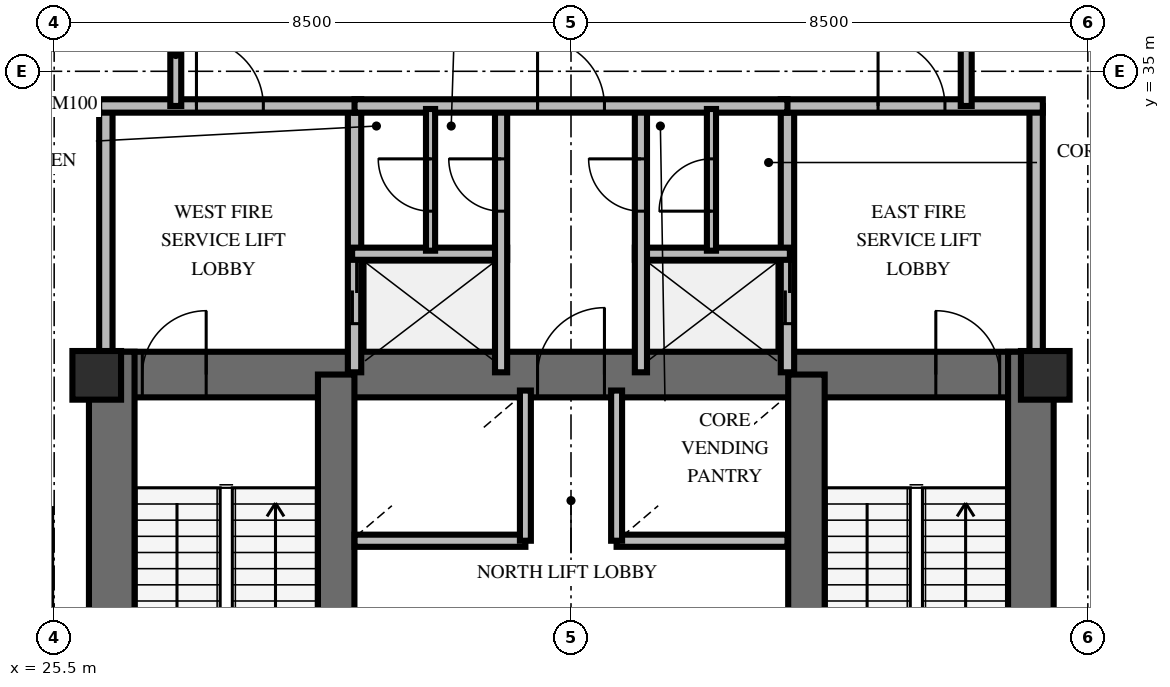
"""IFC4 building model, lengths in metres.
Left out: names, types, materials, properties, quantities, classifications, styles, units other than length and angle.
Written with IfcOpenShell. Run it as: python <this file> out.ifc"""

import sys

from ifc_helpers import new_model, si_unit, direction, frame, frame_2d, origin, origin_2d, place, context, subcontext, project, spatial, rectangle, extrude, element, fill, save


model = new_model("IFC4")
c1 = context("Model", 3, precision=1e-05, world=origin(), true_north=direction((0.0, 1.0)))
c2 = subcontext(c1, "Body", "Model", "MODEL_VIEW")
j1 = project(units=[si_unit("LENGTHUNIT", "METRE"), si_unit("PLANEANGLEUNIT", "RADIAN")], contexts=[c1])
p1 = place(None, origin())
s1 = spatial("IfcSite", under=j1, at=p1, CompositionType="ELEMENT")
p2 = place(p1, origin())
s2 = spatial("IfcBuilding", under=s1, at=p2, CompositionType="ELEMENT")
p3 = place(p2, frame((0.0, 0.0, 105.8)))
s3 = spatial("IfcBuildingStorey", under=s2, at=p3, CompositionType="ELEMENT", Elevation=105.8)
p4 = place(p3, frame((26.072, 30.013, 0.0), z_axis=(0.0, 0.0, 1.0), x_axis=(1.0, 0.0, 0.0)))
e1 = element("IfcWall", 1, at=p4, inside=s3, PredefinedType="SHEAR", context=c2, shape_type="SweptSolid", body=[
    extrude(rectangle(XDim=15.866, YDim=0.75, at=frame_2d((7.933, 0.0))), origin(), (0.0, 0.0, 1.0), 4.0),
])
p5 = place(p4, frame((0.878, 0.0, 0.0)))
e2 = element("IfcOpeningElement", 2, at=p5, cuts=e1, PredefinedType="OPENING", context=c2, shape_type="SweptSolid", body=[
    extrude(rectangle(XDim=1.05, YDim=2.15, at=frame_2d((0.525, 1.075))), frame((0.0, 0.385, 0.0), z_axis=(0.0, -1.0, 0.0), x_axis=(1.0, 0.0, 0.0)), (0.0, 0.0, 1.0), 0.77),
])
p6 = place(p4, frame((13.928, 0.0, 0.0)))
e3 = element("IfcOpeningElement", 3, at=p6, cuts=e1, PredefinedType="OPENING", context=c2, shape_type="SweptSolid", body=[
    extrude(rectangle(XDim=1.05, YDim=2.15, at=frame_2d((0.525, 1.075))), frame((0.0, 0.385, 0.0), z_axis=(0.0, -1.0, 0.0), x_axis=(1.0, 0.0, 0.0)), (0.0, 0.0, 1.0), 0.77),
])
p7 = place(p4, frame((7.378, 0.0, 0.0)))
e4 = element("IfcOpeningElement", 4, at=p7, cuts=e1, PredefinedType="OPENING", context=c2, shape_type="SweptSolid", body=[
    extrude(rectangle(XDim=1.1, YDim=2.15, at=frame_2d((0.55, 1.075))), frame((0.0, 0.385, 0.0), z_axis=(0.0, -1.0, 0.0), x_axis=(1.0, 0.0, 0.0)), (0.0, 0.0, 1.0), 0.77),
])
for number, where, z_axis, x_axis in (
    (5, (26.447, 19.812, 0.0), (0.0, 0.0, 1.0), (0.0, 1.0, 0.0)),
    (6, (41.563, 19.812, 0.0), (0.0, 0.0, 1.0), (0.0, 1.0, 0.0)),
):
    element("IfcWall", number, at=place(p3, frame(where, z_axis=z_axis, x_axis=x_axis)), inside=s3, PredefinedType="SHEAR", context=c2, shape_type="SweptSolid", body=[
        extrude(rectangle(XDim=10.576, YDim=0.75, at=frame_2d((5.288, 0.0))), origin(), (0.0, 0.0, 1.0), 4.0),
    ])
for number, where, z_axis, x_axis in (
    (7, (30.138, 20.187, 0.0), (0.0, 0.0, 1.0), (0.0, 1.0, 0.0)),
    (8, (37.872, 20.187, 0.0), (0.0, 0.0, 1.0), (0.0, 1.0, 0.0)),
):
    element("IfcWall", number, at=place(p3, frame(where, z_axis=z_axis, x_axis=x_axis)), inside=s3, PredefinedType="SHEAR", context=c2, shape_type="SweptSolid", body=[
        extrude(rectangle(XDim=9.826, YDim=0.6, at=frame_2d((4.913, 0.0))), origin(), (0.0, 0.0, 1.0), 4.0),
    ])
for number, where, z_axis, x_axis in (
    (9, (26.2, 30.0, 0.0), (0.0, 0.0, 1.0), (1.0, 0.0, 0.0)),
    (10, (41.8, 30.0, 0.0), (0.0, 0.0, 1.0), (1.0, 0.0, 0.0)),
):
    element("IfcColumn", number, at=place(p3, frame(where, z_axis=z_axis, x_axis=x_axis)), inside=s3, PredefinedType="PILASTER", context=c2, shape_type="SweptSolid", body=[
        extrude(rectangle(XDim=0.8, YDim=0.8, at=origin_2d()), origin(), (0.0, 0.0, 1.0), 4.0),
    ])
p8 = place(p3, frame((26.35, 30.05, 0.0), z_axis=(0.0, 0.0, 1.0), x_axis=(0.0, 1.0, 0.0)))
e11 = element("IfcWall", 11, at=p8, inside=s3, PredefinedType="SOLIDWALL", context=c2, shape_type="SweptSolid", body=[
    extrude(rectangle(XDim=4.38, YDim=0.22, at=frame_2d((2.19, 0.0))), origin(), (0.0, 0.0, 1.0), 2.8),
])
p9 = place(p3, frame((30.44, 30.05, 0.0), z_axis=(0.0, 0.0, 1.0), x_axis=(0.0, 1.0, 0.0)))
e12 = element("IfcWall", 12, at=p9, inside=s3, PredefinedType="SOLIDWALL", context=c2, shape_type="SweptSolid", body=[
    extrude(rectangle(XDim=4.38, YDim=0.22, at=frame_2d((2.19, 0.0))), origin(), (0.0, 0.0, 1.0), 2.8),
])
p10 = place(p9, frame((0.8, 0.0, 0.0)))
e13 = element("IfcOpeningElement", 13, at=p10, cuts=e12, PredefinedType="OPENING", context=c2, shape_type="SweptSolid", body=[
    extrude(rectangle(XDim=1.05, YDim=2.1, at=frame_2d((0.525, 1.05))), frame((0.0, 0.12, 0.0), z_axis=(0.0, -1.0, 0.0), x_axis=(1.0, 0.0, 0.0)), (0.0, 0.0, 1.0), 0.24),
])
p11 = place(p3, frame((26.24, 34.43, 0.0), z_axis=(0.0, 0.0, 1.0), x_axis=(1.0, 0.0, 0.0)))
e14 = element("IfcWall", 14, at=p11, inside=s3, PredefinedType="SOLIDWALL", context=c2, shape_type="SweptSolid", body=[
    extrude(rectangle(XDim=4.31, YDim=0.22, at=frame_2d((2.155, 0.0))), origin(), (0.0, 0.0, 1.0), 2.8),
])
p12 = place(p11, frame((1.6, 0.0, 0.0)))
e15 = element("IfcOpeningElement", 15, at=p12, cuts=e14, PredefinedType="OPENING", context=c2, shape_type="SweptSolid", body=[
    extrude(rectangle(XDim=1.1, YDim=2.15, at=frame_2d((0.55, 1.075))), frame((0.0, 0.12, 0.0), z_axis=(0.0, -1.0, 0.0), x_axis=(1.0, 0.0, 0.0)), (0.0, 0.0, 1.0), 0.24),
])
p13 = place(p3, frame((30.4, 32.0, 0.0), z_axis=(0.0, 0.0, 1.0), x_axis=(1.0, 0.0, 0.0)))
e16 = element("IfcWall", 16, at=p13, inside=s3, PredefinedType="SOLIDWALL", context=c2, shape_type="SweptSolid", body=[
    extrude(rectangle(XDim=2.55, YDim=0.2, at=frame_2d((1.275, 0.0))), origin(), (0.0, 0.0, 1.0), 2.8),
])
p14 = place(p3, frame((32.85, 30.05, 0.0), z_axis=(0.0, 0.0, 1.0), x_axis=(0.0, 1.0, 0.0)))
e17 = element("IfcWall", 17, at=p14, inside=s3, PredefinedType="SOLIDWALL", context=c2, shape_type="SweptSolid", body=[
    extrude(rectangle(XDim=4.38, YDim=0.2, at=frame_2d((2.19, 0.0))), origin(), (0.0, 0.0, 1.0), 2.8),
])
p15 = place(p14, frame((2.65, 0.0, 0.0)))
e18 = element("IfcOpeningElement", 18, at=p15, cuts=e17, PredefinedType="OPENING", context=c2, shape_type="SweptSolid", body=[
    extrude(rectangle(XDim=0.86, YDim=2.05, at=frame_2d((0.43, 1.025))), frame((0.0, 0.11, 0.0), z_axis=(0.0, -1.0, 0.0), x_axis=(1.0, 0.0, 0.0)), (0.0, 0.0, 1.0), 0.22),
])
p16 = place(p3, frame((37.56, 30.05, 0.0), z_axis=(0.0, 0.0, 1.0), x_axis=(0.0, 1.0, 0.0)))
e19 = element("IfcWall", 19, at=p16, inside=s3, PredefinedType="SOLIDWALL", context=c2, shape_type="SweptSolid", body=[
    extrude(rectangle(XDim=4.38, YDim=0.22, at=frame_2d((2.19, 0.0))), origin(), (0.0, 0.0, 1.0), 2.8),
])
p17 = place(p16, frame((0.8, 0.0, 0.0)))
e20 = element("IfcOpeningElement", 20, at=p17, cuts=e19, PredefinedType="OPENING", context=c2, shape_type="SweptSolid", body=[
    extrude(rectangle(XDim=1.05, YDim=2.1, at=frame_2d((0.525, 1.05))), frame((0.0, 0.12, 0.0), z_axis=(0.0, -1.0, 0.0), x_axis=(1.0, 0.0, 0.0)), (0.0, 0.0, 1.0), 0.24),
])
p18 = place(p3, frame((41.65, 30.05, 0.0), z_axis=(0.0, 0.0, 1.0), x_axis=(0.0, 1.0, 0.0)))
e21 = element("IfcWall", 21, at=p18, inside=s3, PredefinedType="SOLIDWALL", context=c2, shape_type="SweptSolid", body=[
    extrude(rectangle(XDim=4.38, YDim=0.22, at=frame_2d((2.19, 0.0))), origin(), (0.0, 0.0, 1.0), 2.8),
])
p19 = place(p3, frame((37.45, 34.43, 0.0), z_axis=(0.0, 0.0, 1.0), x_axis=(1.0, 0.0, 0.0)))
e22 = element("IfcWall", 22, at=p19, inside=s3, PredefinedType="SOLIDWALL", context=c2, shape_type="SweptSolid", body=[
    extrude(rectangle(XDim=4.31, YDim=0.22, at=frame_2d((2.155, 0.0))), origin(), (0.0, 0.0, 1.0), 2.8),
])
p20 = place(p19, frame((1.6, 0.0, 0.0)))
e23 = element("IfcOpeningElement", 23, at=p20, cuts=e22, PredefinedType="OPENING", context=c2, shape_type="SweptSolid", body=[
    extrude(rectangle(XDim=1.1, YDim=2.15, at=frame_2d((0.55, 1.075))), frame((0.0, 0.12, 0.0), z_axis=(0.0, -1.0, 0.0), x_axis=(1.0, 0.0, 0.0)), (0.0, 0.0, 1.0), 0.24),
])
p21 = place(p3, frame((35.05, 32.0, 0.0), z_axis=(0.0, 0.0, 1.0), x_axis=(1.0, 0.0, 0.0)))
e24 = element("IfcWall", 24, at=p21, inside=s3, PredefinedType="SOLIDWALL", context=c2, shape_type="SweptSolid", body=[
    extrude(rectangle(XDim=2.55, YDim=0.2, at=frame_2d((1.275, 0.0))), origin(), (0.0, 0.0, 1.0), 2.8),
])
p22 = place(p3, frame((35.15, 30.05, 0.0), z_axis=(0.0, 0.0, 1.0), x_axis=(0.0, 1.0, 0.0)))
e25 = element("IfcWall", 25, at=p22, inside=s3, PredefinedType="SOLIDWALL", context=c2, shape_type="SweptSolid", body=[
    extrude(rectangle(XDim=4.38, YDim=0.2, at=frame_2d((2.19, 0.0))), origin(), (0.0, 0.0, 1.0), 2.8),
])
p23 = place(p22, frame((2.65, 0.0, 0.0)))
e26 = element("IfcOpeningElement", 26, at=p23, cuts=e25, PredefinedType="OPENING", context=c2, shape_type="SweptSolid", body=[
    extrude(rectangle(XDim=0.86, YDim=2.05, at=frame_2d((0.43, 1.025))), frame((0.0, 0.11, 0.0), z_axis=(0.0, -1.0, 0.0), x_axis=(1.0, 0.0, 0.0)), (0.0, 0.0, 1.0), 0.22),
])
p24 = place(p3, frame((30.44, 34.43, 0.0), z_axis=(0.0, 0.0, 1.0), x_axis=(1.0, 0.0, 0.0)))
e27 = element("IfcWall", 27, at=p24, inside=s3, PredefinedType="SOLIDWALL", context=c2, shape_type="SweptSolid", body=[
    extrude(rectangle(XDim=7.12, YDim=0.22, at=frame_2d((3.56, 0.0))), origin(), (0.0, 0.0, 1.0), 2.8),
])
p25 = place(p24, frame((3.01, 0.0, 0.0)))
e28 = element("IfcOpeningElement", 28, at=p25, cuts=e27, PredefinedType="OPENING", context=c2, shape_type="SweptSolid", body=[
    extrude(rectangle(XDim=1.1, YDim=2.15, at=frame_2d((0.55, 1.075))), frame((0.0, 0.12, 0.0), z_axis=(0.0, -1.0, 0.0), x_axis=(1.0, 0.0, 0.0)), (0.0, 0.0, 1.0), 0.24),
])
p26 = place(p3, frame((31.69, 32.05, 0.0), z_axis=(0.0, 0.0, 1.0), x_axis=(0.0, 1.0, 0.0)))
e29 = element("IfcWall", 29, at=p26, inside=s3, PredefinedType="PARTITIONING", context=c2, shape_type="SweptSolid", body=[
    extrude(rectangle(XDim=2.33, YDim=0.15, at=frame_2d((1.165, 0.0))), origin(), (0.0, 0.0, 1.0), 2.8),
])
p27 = place(p26, frame((0.65, 0.0, 0.0)))
e30 = element("IfcOpeningElement", 30, at=p27, cuts=e29, PredefinedType="OPENING", context=c2, shape_type="SweptSolid", body=[
    extrude(rectangle(XDim=0.86, YDim=2.05, at=frame_2d((0.43, 1.025))), frame((0.0, 0.085, 0.0), z_axis=(0.0, -1.0, 0.0), x_axis=(1.0, 0.0, 0.0)), (0.0, 0.0, 1.0), 0.17),
])
p28 = place(p3, frame((36.31, 32.05, 0.0), z_axis=(0.0, 0.0, 1.0), x_axis=(0.0, 1.0, 0.0)))
e31 = element("IfcWall", 31, at=p28, inside=s3, PredefinedType="PARTITIONING", context=c2, shape_type="SweptSolid", body=[
    extrude(rectangle(XDim=2.33, YDim=0.15, at=frame_2d((1.165, 0.0))), origin(), (0.0, 0.0, 1.0), 2.8),
])
p29 = place(p28, frame((0.65, 0.0, 0.0)))
e32 = element("IfcOpeningElement", 32, at=p29, cuts=e31, PredefinedType="OPENING", context=c2, shape_type="SweptSolid", body=[
    extrude(rectangle(XDim=0.86, YDim=2.05, at=frame_2d((0.43, 1.025))), frame((0.0, 0.085, 0.0), z_axis=(0.0, -1.0, 0.0), x_axis=(1.0, 0.0, 0.0)), (0.0, 0.0, 1.0), 0.17),
])
p30 = place(p3, frame((30.44, 27.28, 0.0), z_axis=(0.0, 0.0, 1.0), x_axis=(1.0, 0.0, 0.0)))
e33 = element("IfcWall", 33, at=p30, inside=s3, PredefinedType="SOLIDWALL", context=c2, shape_type="SweptSolid", body=[
    extrude(rectangle(XDim=2.81, YDim=0.2, at=frame_2d((1.405, 0.0))), origin(), (0.0, 0.0, 1.0), 2.8),
])
p31 = place(p3, frame((33.25, 27.28, 0.0), z_axis=(0.0, 0.0, 1.0), x_axis=(0.0, 1.0, 0.0)))
e34 = element("IfcWall", 34, at=p31, inside=s3, PredefinedType="SOLIDWALL", context=c2, shape_type="SweptSolid", body=[
    extrude(rectangle(XDim=2.47, YDim=0.18, at=frame_2d((1.235, 0.0))), origin(), (0.0, 0.0, 1.0), 2.8),
])
p32 = place(p3, frame((34.75, 27.28, 0.0), z_axis=(0.0, 0.0, 1.0), x_axis=(1.0, 0.0, 0.0)))
e35 = element("IfcWall", 35, at=p32, inside=s3, PredefinedType="SOLIDWALL", context=c2, shape_type="SweptSolid", body=[
    extrude(rectangle(XDim=2.81, YDim=0.2, at=frame_2d((1.405, 0.0))), origin(), (0.0, 0.0, 1.0), 2.8),
])
p33 = place(p3, frame((34.75, 27.28, 0.0), z_axis=(0.0, 0.0, 1.0), x_axis=(0.0, 1.0, 0.0)))
e36 = element("IfcWall", 36, at=p33, inside=s3, PredefinedType="SOLIDWALL", context=c2, shape_type="SweptSolid", body=[
    extrude(rectangle(XDim=2.47, YDim=0.18, at=frame_2d((1.235, 0.0))), origin(), (0.0, 0.0, 1.0), 2.8),
])
for number, where, z_axis, x_axis in (
    (37, (27.5, 34.43, 0.0), (0.0, 0.0, 1.0), (0.0, 1.0, 0.0)),
    (38, (40.5, 36.123, 0.0), (0.0, 0.0, 1.0), (0.0, -1.0, 0.0)),
):
    element("IfcWall", number, at=place(p3, frame(where, z_axis=z_axis, x_axis=x_axis)), inside=s3, PredefinedType="PARTITIONING", context=c2, shape_type="SweptSolid", body=[
        extrude(rectangle(XDim=1.693, YDim=0.18, at=frame_2d((0.846, 0.0))), origin(), (0.0, 0.0, 1.0), 2.8),
    ])
p34 = place(p3, frame((26.81, 37.919, 0.0), z_axis=(0.0, 0.0, 1.0), x_axis=(-0.764925735115, -0.644118482702, 0.0)))
e39 = element("IfcWall", 39, at=p34, inside=s3, PredefinedType="PARTITIONING", context=c2, shape_type="SweptSolid", body=[
    extrude(rectangle(XDim=4.355, YDim=0.18, at=frame_2d((2.177, 0.0))), origin(), (0.0, 0.0, 1.0), 2.8),
])
p35 = place(p34, frame((2.441, 0.0, 0.0)))
e40 = element("IfcOpeningElement", 40, at=p35, cuts=e39, PredefinedType="OPENING", context=c2, shape_type="SweptSolid", body=[
    extrude(rectangle(XDim=1.0, YDim=2.15, at=frame_2d((0.5, 1.075))), frame((0.0, 0.1, 0.0), z_axis=(0.0, -1.0, 0.0), x_axis=(1.0, 0.0, 0.0)), (0.0, 0.0, 1.0), 0.2),
])
p36 = place(p3, frame((45.102, 34.397, 0.0), z_axis=(0.0, 0.0, 1.0), x_axis=(-0.732539820955, 0.680724181086, 0.0)))
e41 = element("IfcWall", 41, at=p36, inside=s3, PredefinedType="PARTITIONING", context=c2, shape_type="SweptSolid", body=[
    extrude(rectangle(XDim=4.834, YDim=0.18, at=frame_2d((2.417, 0.0))), origin(), (0.0, 0.0, 1.0), 2.8),
])
p37 = place(p5, origin())
e42 = element("IfcDoor", 42, at=p37, inside=s3, OperationType="SINGLE_SWING_RIGHT", PredefinedType="DOOR", context=c2, shape_type="SweptSolid", body=[
    extrude(rectangle(XDim=1.05, YDim=2.15, at=frame_2d((0.525, 1.075))), frame((0.0, 0.025, 0.0), z_axis=(0.0, -1.0, 0.0), x_axis=(1.0, 0.0, 0.0)), (0.0, 0.0, 1.0), 0.05),
])
fill(e2, e42)
p38 = place(p6, origin())
e43 = element("IfcDoor", 43, at=p38, inside=s3, OperationType="SINGLE_SWING_LEFT", PredefinedType="DOOR", context=c2, shape_type="SweptSolid", body=[
    extrude(rectangle(XDim=1.05, YDim=2.15, at=frame_2d((0.525, 1.075))), frame((0.0, 0.025, 0.0), z_axis=(0.0, -1.0, 0.0), x_axis=(1.0, 0.0, 0.0)), (0.0, 0.0, 1.0), 0.05),
])
fill(e3, e43)
p39 = place(p7, origin())
e44 = element("IfcDoor", 44, at=p39, inside=s3, OperationType="SINGLE_SWING_RIGHT", PredefinedType="DOOR", context=c2, shape_type="SweptSolid", body=[
    extrude(rectangle(XDim=1.1, YDim=2.15, at=frame_2d((0.55, 1.075))), frame((0.0, 0.025, 0.0), z_axis=(0.0, -1.0, 0.0), x_axis=(1.0, 0.0, 0.0)), (0.0, 0.0, 1.0), 0.05),
])
fill(e4, e44)
p40 = place(p12, origin())
e45 = element("IfcDoor", 45, at=p40, inside=s3, OperationType="SINGLE_SWING_LEFT", PredefinedType="DOOR", context=c2, shape_type="SweptSolid", body=[
    extrude(rectangle(XDim=1.1, YDim=2.15, at=frame_2d((0.55, 1.075))), frame((0.0, 0.025, 0.0), z_axis=(0.0, -1.0, 0.0), x_axis=(1.0, 0.0, 0.0)), (0.0, 0.0, 1.0), 0.05),
])
fill(e15, e45)
p41 = place(p10, origin())
e46 = element("IfcDoor", 46, at=p41, inside=s3, OperationType="DOUBLE_DOOR_SLIDING", PredefinedType="USERDEFINED", context=c2, shape_type="SweptSolid", body=[
    extrude(rectangle(XDim=1.05, YDim=2.1, at=frame_2d((0.525, 1.05))), frame((0.0, 0.025, 0.0), z_axis=(0.0, -1.0, 0.0), x_axis=(1.0, 0.0, 0.0)), (0.0, 0.0, 1.0), 0.05),
])
fill(e13, e46)
p42 = place(p15, origin())
e47 = element("IfcDoor", 47, at=p42, inside=s3, OperationType="SINGLE_SWING_RIGHT", PredefinedType="TRAPDOOR", context=c2, shape_type="SweptSolid", body=[
    extrude(rectangle(XDim=0.86, YDim=2.05, at=frame_2d((0.43, 1.025))), frame((0.0, 0.025, 0.0), z_axis=(0.0, -1.0, 0.0), x_axis=(1.0, 0.0, 0.0)), (0.0, 0.0, 1.0), 0.05),
])
fill(e18, e47)
p43 = place(p20, origin())
e48 = element("IfcDoor", 48, at=p43, inside=s3, OperationType="SINGLE_SWING_LEFT", PredefinedType="DOOR", context=c2, shape_type="SweptSolid", body=[
    extrude(rectangle(XDim=1.1, YDim=2.15, at=frame_2d((0.55, 1.075))), frame((0.0, 0.025, 0.0), z_axis=(0.0, -1.0, 0.0), x_axis=(1.0, 0.0, 0.0)), (0.0, 0.0, 1.0), 0.05),
])
fill(e23, e48)
p44 = place(p17, origin())
e49 = element("IfcDoor", 49, at=p44, inside=s3, OperationType="DOUBLE_DOOR_SLIDING", PredefinedType="USERDEFINED", context=c2, shape_type="SweptSolid", body=[
    extrude(rectangle(XDim=1.05, YDim=2.1, at=frame_2d((0.525, 1.05))), frame((0.0, 0.025, 0.0), z_axis=(0.0, -1.0, 0.0), x_axis=(1.0, 0.0, 0.0)), (0.0, 0.0, 1.0), 0.05),
])
fill(e20, e49)
p45 = place(p23, origin())
e50 = element("IfcDoor", 50, at=p45, inside=s3, OperationType="SINGLE_SWING_RIGHT", PredefinedType="TRAPDOOR", context=c2, shape_type="SweptSolid", body=[
    extrude(rectangle(XDim=0.86, YDim=2.05, at=frame_2d((0.43, 1.025))), frame((0.0, 0.025, 0.0), z_axis=(0.0, -1.0, 0.0), x_axis=(1.0, 0.0, 0.0)), (0.0, 0.0, 1.0), 0.05),
])
fill(e26, e50)
p46 = place(p25, origin())
e51 = element("IfcDoor", 51, at=p46, inside=s3, OperationType="SINGLE_SWING_LEFT", PredefinedType="DOOR", context=c2, shape_type="SweptSolid", body=[
    extrude(rectangle(XDim=1.1, YDim=2.15, at=frame_2d((0.55, 1.075))), frame((0.0, 0.025, 0.0), z_axis=(0.0, -1.0, 0.0), x_axis=(1.0, 0.0, 0.0)), (0.0, 0.0, 1.0), 0.05),
])
fill(e28, e51)
p47 = place(p27, origin())
e52 = element("IfcDoor", 52, at=p47, inside=s3, OperationType="SINGLE_SWING_RIGHT", PredefinedType="TRAPDOOR", context=c2, shape_type="SweptSolid", body=[
    extrude(rectangle(XDim=0.86, YDim=2.05, at=frame_2d((0.43, 1.025))), frame((0.0, 0.025, 0.0), z_axis=(0.0, -1.0, 0.0), x_axis=(1.0, 0.0, 0.0)), (0.0, 0.0, 1.0), 0.05),
])
fill(e30, e52)
p48 = place(p29, origin())
e53 = element("IfcDoor", 53, at=p48, inside=s3, OperationType="SINGLE_SWING_LEFT", PredefinedType="TRAPDOOR", context=c2, shape_type="SweptSolid", body=[
    extrude(rectangle(XDim=0.86, YDim=2.05, at=frame_2d((0.43, 1.025))), frame((0.0, 0.025, 0.0), z_axis=(0.0, -1.0, 0.0), x_axis=(1.0, 0.0, 0.0)), (0.0, 0.0, 1.0), 0.05),
])
fill(e32, e53)
save(model, sys.argv[1])
